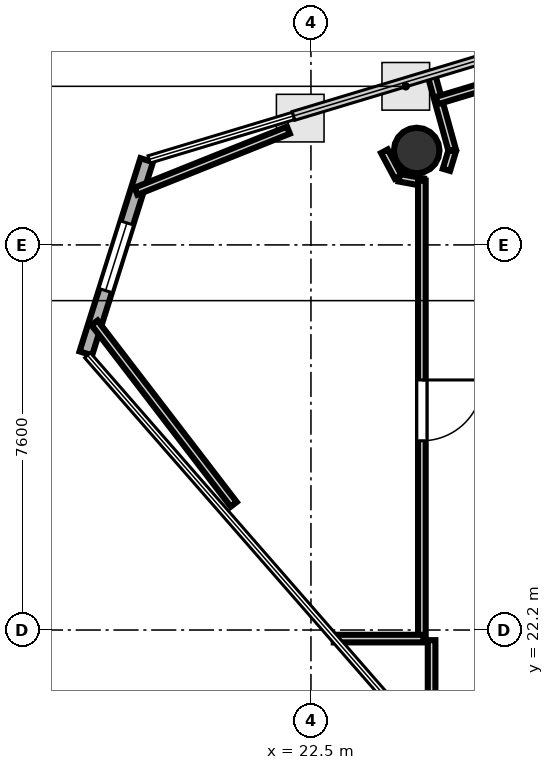
"""IFC4 building model, lengths in metres.
Left out: names, types, materials, properties, quantities, classifications, styles, units other than length and angle.
Written with IfcOpenShell. Run it as: python <this file> out.ifc"""

import sys

from ifc_helpers import new_model, si_unit, direction, frame, frame_2d, origin, origin_2d, place, context, subcontext, project, spatial, rectangle, hollow_circle, extrude, element, fill, save


model = new_model("IFC4")
c1 = context("Model", 3, precision=1e-05, world=origin(), true_north=direction((0.0, 1.0)))
c2 = subcontext(c1, "Body", "Model", "MODEL_VIEW")
j1 = project(units=[si_unit("LENGTHUNIT", "METRE"), si_unit("PLANEANGLEUNIT", "RADIAN")], contexts=[c1])
p1 = place(None, origin())
s1 = spatial("IfcSite", under=j1, at=p1, CompositionType="ELEMENT")
p2 = place(p1, origin())
s2 = spatial("IfcBuilding", under=s1, at=p2, CompositionType="ELEMENT")
p3 = place(p2, frame((0.0, 0.0, 321.3)))
s3 = spatial("IfcBuildingStorey", under=s2, at=p3, CompositionType="ELEMENT", Elevation=321.3)
p4 = place(p3, frame((24.587, 31.663, 0.0), z_axis=(0.0, 0.0, 1.0), x_axis=(1.0, 0.0, 0.0)))
e1 = element("IfcColumn", 1, at=p4, inside=s3, PredefinedType="COLUMN", context=c2, shape_type="SweptSolid", body=[
    extrude(hollow_circle(Radius=0.45, WallThickness=0.025, at=origin_2d()), origin(), (0.0, 0.0, 1.0), 4.6),
])
p5 = place(p3, frame((19.259, 31.473, 0.0), z_axis=(0.0, 0.0, 1.0), x_axis=(-0.300558508895, -0.953763378795, 0.0)))
e2 = element("IfcWall", 2, at=p5, inside=s3, PredefinedType="SOLIDWALL", context=c2, shape_type="SweptSolid", body=[
    extrude(rectangle(XDim=3.998, YDim=0.26, at=frame_2d((1.999, 0.0))), origin(), (0.0, 0.0, 1.0), 4.42),
])
p6 = place(p5, frame((1.299, 0.0, 1.0)))
e3 = element("IfcOpeningElement", 3, at=p6, cuts=e2, PredefinedType="OPENING", context=c2, shape_type="SweptSolid", body=[
    extrude(rectangle(XDim=1.4, YDim=1.5, at=frame_2d((0.7, 0.75))), frame((0.0, 0.14, 0.0), z_axis=(0.0, -1.0, 0.0), x_axis=(1.0, 0.0, 0.0)), (0.0, 0.0, 1.0), 0.28),
])
p7 = place(p3, frame((19.048, 30.86, 0.0), z_axis=(0.0, 0.0, 1.0), x_axis=(0.928273862515, 0.371897346283, 0.0)))
e4 = element("IfcWall", 4, at=p7, inside=s3, PredefinedType="PARTITIONING", context=c2, shape_type="SweptSolid", body=[
    extrude(rectangle(XDim=3.24, YDim=0.15, at=frame_2d((1.62, 0.0))), origin(), (0.0, 0.0, 1.0), 2.94),
])
p8 = place(p3, frame((23.95, 31.648, 0.0), z_axis=(0.0, 0.0, 1.0), x_axis=(0.471160949405, -0.882047254832, 0.0)))
e5 = element("IfcWall", 5, at=p8, inside=s3, PredefinedType="PARTITIONING", context=c2, shape_type="SweptSolid", body=[
    extrude(rectangle(XDim=0.575, YDim=0.15, at=frame_2d((0.288, 0.0))), origin(), (0.0, 0.0, 1.0), 2.94),
])
p9 = place(p3, frame((24.242, 31.125, 0.0), z_axis=(0.0, 0.0, 1.0), x_axis=(0.983550856106, -0.180631429859, 0.0)))
e6 = element("IfcWall", 6, at=p9, inside=s3, PredefinedType="PARTITIONING", context=c2, shape_type="SweptSolid", body=[
    extrude(rectangle(XDim=0.48, YDim=0.15, at=frame_2d((0.24, 0.0))), origin(), (0.0, 0.0, 1.0), 2.94),
])
p10 = place(p3, frame((24.689, 31.069, 0.0), z_axis=(0.0, 0.0, 1.0), x_axis=(0.0, -1.0, 0.0)))
e7 = element("IfcWall", 7, at=p10, inside=s3, PredefinedType="PARTITIONING", context=c2, shape_type="SweptSolid", body=[
    extrude(rectangle(XDim=9.069, YDim=0.15, at=frame_2d((4.535, 0.0))), origin(), (0.0, 0.0, 1.0), 2.94),
])
p11 = place(p10, frame((3.935, 0.0, 0.0)))
e8 = element("IfcOpeningElement", 8, at=p11, cuts=e7, PredefinedType="OPENING", context=c2, shape_type="SweptSolid", body=[
    extrude(rectangle(XDim=1.2, YDim=2.15, at=frame_2d((0.6, 1.075))), frame((0.0, 0.085, 0.0), z_axis=(0.0, -1.0, 0.0), x_axis=(1.0, 0.0, 0.0)), (0.0, 0.0, 1.0), 0.17),
])
p12 = place(p3, frame((24.72, 22.031, 0.0), z_axis=(0.0, 0.0, 1.0), x_axis=(-1.0, 0.0, 0.0)))
e9 = element("IfcWall", 9, at=p12, inside=s3, PredefinedType="PARTITIONING", context=c2, shape_type="SweptSolid", body=[
    extrude(rectangle(XDim=1.77, YDim=0.15, at=frame_2d((0.885, 0.0))), origin(), (0.0, 0.0, 1.0), 2.94),
])
p13 = place(p3, frame((20.976, 24.68, 0.0), z_axis=(0.0, 0.0, 1.0), x_axis=(-0.608575737729, 0.793495791701, 0.0)))
e10 = element("IfcWall", 10, at=p13, inside=s3, PredefinedType="PARTITIONING", context=c2, shape_type="SweptSolid", body=[
    extrude(rectangle(XDim=4.514, YDim=0.15, at=frame_2d((2.257, 0.0))), origin(), (0.0, 0.0, 1.0), 2.94),
])
p14 = place(p3, frame((24.881, 19.822, 0.0), z_axis=(0.0, 0.0, 1.0), x_axis=(0.0, 1.0, 0.0)))
e11 = element("IfcWall", 11, at=p14, inside=s3, PredefinedType="PARTITIONING", context=c2, shape_type="SweptSolid", body=[
    extrude(rectangle(XDim=2.178, YDim=0.15, at=frame_2d((1.089, 0.0))), origin(), (0.0, 0.0, 1.0), 2.94),
])
p15 = place(p3, frame((25.174, 31.282, 0.0), z_axis=(0.0, 0.0, 1.0), x_axis=(0.290512380904, 0.956871232999, 0.0)))
e12 = element("IfcWall", 12, at=p15, inside=s3, PredefinedType="PARTITIONING", context=c2, shape_type="SweptSolid", body=[
    extrude(rectangle(XDim=0.389, YDim=0.15, at=frame_2d((0.195, 0.0))), origin(), (0.0, 0.0, 1.0), 2.94),
])
p16 = place(p3, frame((25.287, 31.671, 0.0), z_axis=(0.0, 0.0, 1.0), x_axis=(-0.266985792428, 0.963700465208, 0.0)))
e13 = element("IfcWall", 13, at=p16, inside=s3, PredefinedType="PARTITIONING", context=c2, shape_type="SweptSolid", body=[
    extrude(rectangle(XDim=1.569, YDim=0.15, at=frame_2d((0.785, 0.0))), origin(), (0.0, 0.0, 1.0), 2.94),
])
p17 = place(p3, frame((24.985, 32.648, 0.0), z_axis=(0.0, 0.0, 1.0), x_axis=(0.957484948061, 0.288483230427, 0.0)))
e14 = element("IfcWall", 14, at=p17, inside=s3, PredefinedType="PARTITIONING", context=c2, shape_type="SweptSolid", body=[
    extrude(rectangle(XDim=2.761, YDim=0.15, at=frame_2d((1.381, 0.0))), origin(), (0.0, 0.0, 1.0), 2.94),
])
p18 = place(p11, origin())
e15 = element("IfcDoor", 15, at=p18, inside=s3, OperationType="SINGLE_SWING_LEFT", PredefinedType="DOOR", context=c2, shape_type="SweptSolid", body=[
    extrude(rectangle(XDim=1.2, YDim=2.15, at=frame_2d((0.6, 1.075))), frame((0.0, 0.025, 0.0), z_axis=(0.0, -1.0, 0.0), x_axis=(1.0, 0.0, 0.0)), (0.0, 0.0, 1.0), 0.05),
])
fill(e8, e15)
p19 = place(p6, origin())
e16 = element("IfcWindow", 16, at=p19, inside=s3, PartitioningType="SINGLE_PANEL", PredefinedType="WINDOW", context=c2, shape_type="SweptSolid", body=[
    extrude(rectangle(XDim=1.4, YDim=1.5, at=frame_2d((0.7, 0.75))), frame((0.0, 0.03, 0.0), z_axis=(0.0, -1.0, 0.0), x_axis=(1.0, 0.0, 0.0)), (0.0, 0.0, 1.0), 0.06),
])
fill(e3, e16)
save(model, sys.argv[1])
